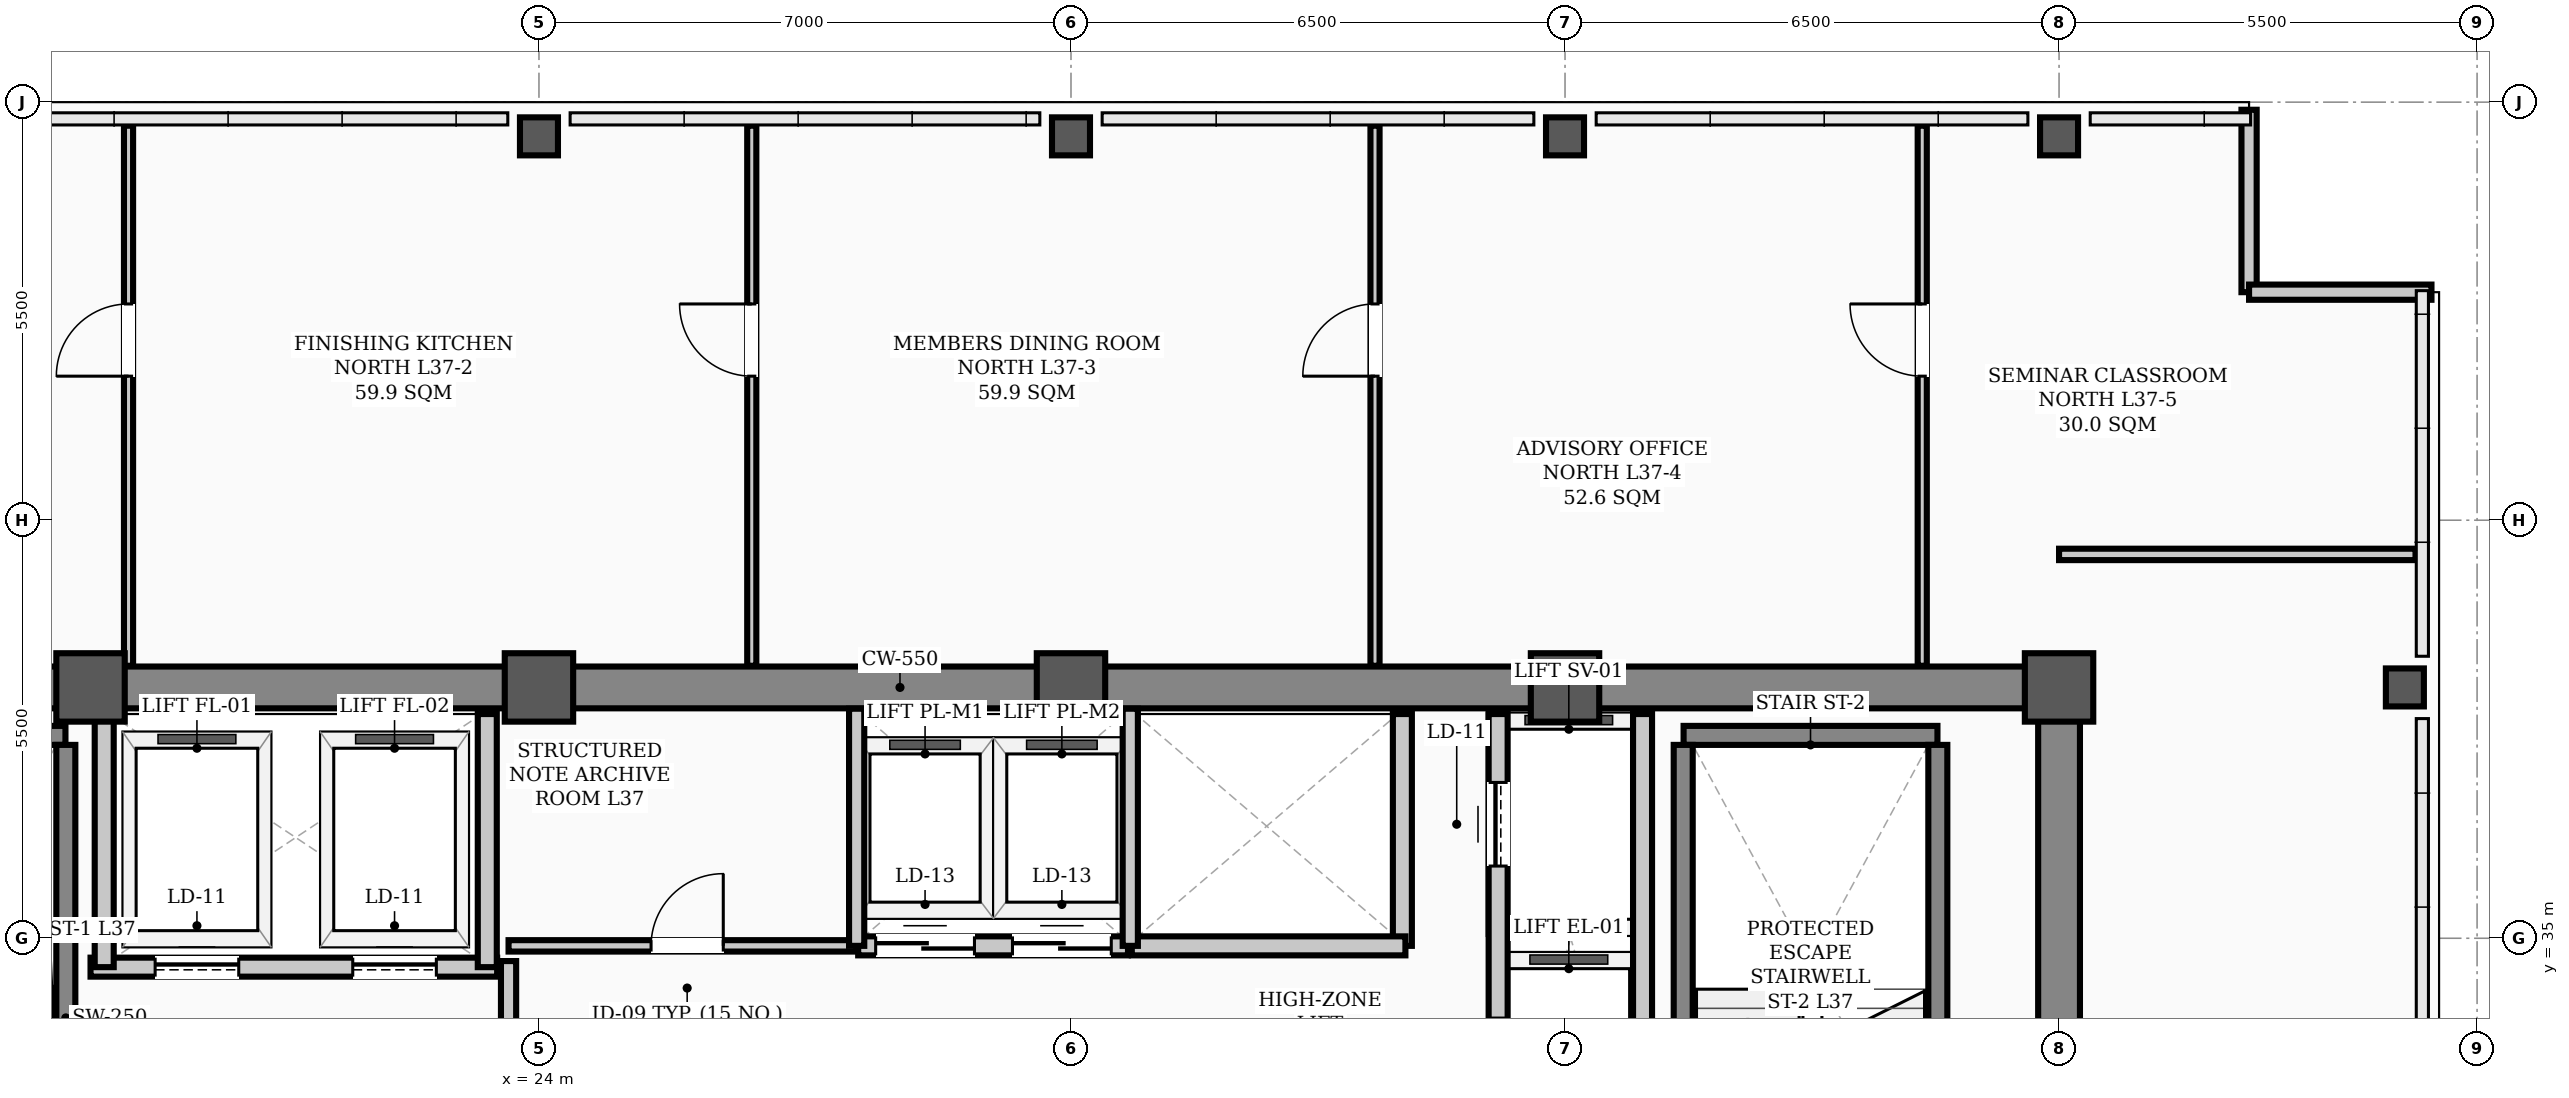
"""IFC4 building model, lengths in metres.
Left out: names, types, materials, properties, quantities, classifications, styles, units other than length and angle.
Written with IfcOpenShell. Run it as: python <this file> out.ifc"""

import sys

from ifc_helpers import new_model, si_unit, direction, frame, frame_2d, origin, origin_2d, place, context, subcontext, project, spatial, rectangle, hollow_rectangle, extrude, element, fill, save


model = new_model("IFC4")
c1 = context("Model", 3, precision=1e-05, world=origin(), true_north=direction((0.0, 1.0)))
c2 = subcontext(c1, "Body", "Model", "MODEL_VIEW")
j1 = project(units=[si_unit("LENGTHUNIT", "METRE"), si_unit("PLANEANGLEUNIT", "RADIAN")], contexts=[c1])
p1 = place(None, origin())
s1 = spatial("IfcSite", under=j1, at=p1, CompositionType="ELEMENT")
p2 = place(p1, origin())
s2 = spatial("IfcBuilding", under=s1, at=p2, CompositionType="ELEMENT")
p3 = place(p2, frame((0.0, 0.0, 150.0)))
s3 = spatial("IfcBuildingStorey", under=s2, at=p3, CompositionType="ELEMENT", Elevation=150.0)
for number, where, z_axis, x_axis in (
    (1, (18.1, 38.3, 0.0), (0.0, 0.0, 1.0), (1.0, 0.0, 0.0)),
    (2, (24.0, 38.3, 0.0), (0.0, 0.0, 1.0), (1.0, 0.0, 0.0)),
    (3, (31.0, 38.3, 0.0), (0.0, 0.0, 1.0), (1.0, 0.0, 0.0)),
    (4, (37.5, 38.3, 0.0), (0.0, 0.0, 1.0), (1.0, 0.0, 0.0)),
    (5, (44.0, 38.3, 0.0), (0.0, 0.0, 1.0), (1.0, 0.0, 0.0)),
):
    element("IfcColumn", number, at=place(p3, frame(where, z_axis=z_axis, x_axis=x_axis)), inside=s3, PredefinedType="COLUMN", context=c2, shape_type="SweptSolid", body=[
        extrude(hollow_rectangle(XDim=0.9, YDim=0.9, WallThickness=0.035, InnerFilletRadius=0.017, OuterFilletRadius=0.052, at=origin_2d()), origin(), (0.0, 0.0, 1.0), 3.9),
    ])
for number, where, z_axis, x_axis in (
    (6, (24.0, 45.55, 0.0), (0.0, 0.0, 1.0), (1.0, 0.0, 0.0)),
    (7, (31.0, 45.55, 0.0), (0.0, 0.0, 1.0), (1.0, 0.0, 0.0)),
    (8, (37.5, 45.55, 0.0), (0.0, 0.0, 1.0), (1.0, 0.0, 0.0)),
    (9, (44.0, 45.55, 0.0), (0.0, 0.0, 1.0), (1.0, 0.0, 0.0)),
    (10, (48.55, 38.3, 0.0), (0.0, 0.0, 1.0), (1.0, 0.0, 0.0)),
):
    element("IfcColumn", number, at=place(p3, frame(where, z_axis=z_axis, x_axis=x_axis)), inside=s3, PredefinedType="COLUMN", context=c2, shape_type="SweptSolid", body=[
        extrude(hollow_rectangle(XDim=0.5, YDim=0.5, WallThickness=0.024, InnerFilletRadius=0.012, OuterFilletRadius=0.036, at=origin_2d()), origin(), (0.0, 0.0, 1.0), 3.9),
    ])
for number, where, z_axis, x_axis in (
    (11, (46.5, 45.9, 0.0), (0.0, 0.0, 1.0), (0.0, -1.0, 0.0)),
    (12, (46.5, 43.5, 0.0), (0.0, 0.0, 1.0), (1.0, 0.0, 0.0)),
):
    element("IfcWall", number, at=place(p3, frame(where, z_axis=z_axis, x_axis=x_axis)), inside=s3, PredefinedType="PARAPET", context=c2, shape_type="SweptSolid", body=[
        extrude(rectangle(XDim=2.4, YDim=0.2, at=frame_2d((1.2, 0.0))), origin(), (0.0, 0.0, 1.0), 1.2),
    ])
p4 = place(p3, frame((13.5, 38.3, 0.0), z_axis=(0.0, 0.0, 1.0), x_axis=(1.0, 0.0, 0.0)))
e13 = element("IfcWall", 13, at=p4, inside=s3, PredefinedType="SHEAR", context=c2, shape_type="SweptSolid", body=[
    extrude(rectangle(XDim=30.5, YDim=0.55, at=frame_2d((15.25, 0.0))), origin(), (0.0, 0.0, 1.0), 3.72),
])
p5 = place(p3, frame((44.0, 29.35, 0.0), z_axis=(0.0, 0.0, 1.0), x_axis=(0.0, 1.0, 0.0)))
e14 = element("IfcWall", 14, at=p5, inside=s3, PredefinedType="SHEAR", context=c2, shape_type="SweptSolid", body=[
    extrude(rectangle(XDim=8.6, YDim=0.55, at=frame_2d((4.3, 0.0))), origin(), (0.0, 0.0, 1.0), 3.72),
])
p6 = place(p3, frame((14.43, 37.669, 0.0), z_axis=(0.0, 0.0, 1.0), x_axis=(1.0, 0.0, 0.0)))
e15 = element("IfcWall", 15, at=p6, inside=s3, PredefinedType="STANDARD", context=c2, shape_type="SweptSolid", body=[
    extrude(rectangle(XDim=3.34, YDim=0.25, at=frame_2d((1.67, 0.0))), origin(), (0.0, 0.0, 1.0), 3.72),
])
p7 = place(p3, frame((17.775, 30.36, 0.0), z_axis=(0.0, 0.0, 1.0), x_axis=(0.0, 1.0, 0.0)))
e16 = element("IfcWall", 16, at=p7, inside=s3, PredefinedType="STANDARD", context=c2, shape_type="SweptSolid", body=[
    extrude(rectangle(XDim=7.184, YDim=0.25, at=frame_2d((3.592, 0.0))), origin(), (0.0, 0.0, 1.0), 3.72),
])
p8 = place(p3, frame((39.06, 37.669, 0.0), z_axis=(0.0, 0.0, 1.0), x_axis=(1.0, 0.0, 0.0)))
e17 = element("IfcWall", 17, at=p8, inside=s3, PredefinedType="STANDARD", context=c2, shape_type="SweptSolid", body=[
    extrude(rectangle(XDim=3.34, YDim=0.25, at=frame_2d((1.67, 0.0))), origin(), (0.0, 0.0, 1.0), 3.72),
])
for number, where, z_axis, x_axis in (
    (18, (39.055, 30.36, 0.0), (0.0, 0.0, 1.0), (0.0, 1.0, 0.0)),
    (19, (42.405, 30.36, 0.0), (0.0, 0.0, 1.0), (0.0, 1.0, 0.0)),
):
    element("IfcWall", number, at=place(p3, frame(where, z_axis=z_axis, x_axis=x_axis)), inside=s3, PredefinedType="STANDARD", context=c2, shape_type="SweptSolid", body=[
        extrude(rectangle(XDim=7.184, YDim=0.25, at=frame_2d((3.592, 0.0))), origin(), (0.0, 0.0, 1.0), 3.72),
    ])
p9 = place(p3, frame((18.1, 34.62, 0.0), z_axis=(0.0, 0.0, 1.0), x_axis=(1.0, 0.0, 0.0)))
e20 = element("IfcWall", 20, at=p9, inside=s3, PredefinedType="STANDARD", context=c2, shape_type="SweptSolid", body=[
    extrude(rectangle(XDim=5.35, YDim=0.25, at=frame_2d((2.675, 0.0))), origin(), (0.0, 0.0, 1.0), 3.72),
])
p10 = place(p9, frame((0.85, 0.0, 0.0)))
e21 = element("IfcOpeningElement", 21, at=p10, cuts=e20, PredefinedType="OPENING", context=c2, shape_type="SweptSolid", body=[
    extrude(rectangle(XDim=1.1, YDim=2.08, at=frame_2d((0.55, 1.04))), frame((0.0, 0.135, 0.0), z_axis=(0.0, -1.0, 0.0), x_axis=(1.0, 0.0, 0.0)), (0.0, 0.0, 1.0), 0.27),
])
p11 = place(p9, frame((3.45, 0.0, 0.0)))
e22 = element("IfcOpeningElement", 22, at=p11, cuts=e20, PredefinedType="OPENING", context=c2, shape_type="SweptSolid", body=[
    extrude(rectangle(XDim=1.1, YDim=2.08, at=frame_2d((0.55, 1.04))), frame((0.0, 0.135, 0.0), z_axis=(0.0, -1.0, 0.0), x_axis=(1.0, 0.0, 0.0)), (0.0, 0.0, 1.0), 0.27),
])
p12 = place(p3, frame((36.62, 31.95, 0.0), z_axis=(0.0, 0.0, 1.0), x_axis=(0.0, 1.0, 0.0)))
e23 = element("IfcWall", 23, at=p12, inside=s3, PredefinedType="STANDARD", context=c2, shape_type="SweptSolid", body=[
    extrude(rectangle(XDim=6.0, YDim=0.25, at=frame_2d((3.0, 0.0))), origin(), (0.0, 0.0, 1.0), 3.35),
])
p13 = place(p12, frame((0.9, 0.0, 0.0)))
e24 = element("IfcOpeningElement", 24, at=p13, cuts=e23, PredefinedType="OPENING", context=c2, shape_type="SweptSolid", body=[
    extrude(rectangle(XDim=1.1, YDim=2.08, at=frame_2d((0.55, 1.04))), frame((0.0, 0.135, 0.0), z_axis=(0.0, -1.0, 0.0), x_axis=(1.0, 0.0, 0.0)), (0.0, 0.0, 1.0), 0.27),
])
p14 = place(p12, frame((4.0, 0.0, 0.0)))
e25 = element("IfcOpeningElement", 25, at=p14, cuts=e23, PredefinedType="OPENING", context=c2, shape_type="SweptSolid", body=[
    extrude(rectangle(XDim=1.1, YDim=2.08, at=frame_2d((0.55, 1.04))), frame((0.0, 0.135, 0.0), z_axis=(0.0, -1.0, 0.0), x_axis=(1.0, 0.0, 0.0)), (0.0, 0.0, 1.0), 0.27),
])
p15 = place(p3, frame((38.52, 31.95, 0.0), z_axis=(0.0, 0.0, 1.0), x_axis=(0.0, 1.0, 0.0)))
e26 = element("IfcWall", 26, at=p15, inside=s3, PredefinedType="STANDARD", context=c2, shape_type="SweptSolid", body=[
    extrude(rectangle(XDim=6.0, YDim=0.25, at=frame_2d((3.0, 0.0))), origin(), (0.0, 0.0, 1.0), 3.35),
])
for number, where, z_axis, x_axis in (
    (27, (18.28, 34.62, 0.0), (0.0, 0.0, 1.0), (0.0, 1.0, 0.0)),
    (28, (23.32, 34.62, 0.0), (0.0, 0.0, 1.0), (0.0, 1.0, 0.0)),
):
    element("IfcWall", number, at=place(p3, frame(where, z_axis=z_axis, x_axis=x_axis)), inside=s3, PredefinedType="STANDARD", context=c2, shape_type="SweptSolid", body=[
        extrude(rectangle(XDim=3.33, YDim=0.25, at=frame_2d((1.665, 0.0))), origin(), (0.0, 0.0, 1.0), 3.35),
    ])
p16 = place(p3, frame((35.36, 34.9, 0.0), z_axis=(0.0, 0.0, 1.0), x_axis=(0.0, 1.0, 0.0)))
e29 = element("IfcWall", 29, at=p16, inside=s3, PredefinedType="STANDARD", context=c2, shape_type="SweptSolid", body=[
    extrude(rectangle(XDim=3.05, YDim=0.25, at=frame_2d((1.525, 0.0))), origin(), (0.0, 0.0, 1.0), 3.35),
])
p17 = place(p3, frame((28.2, 34.9, 0.0), z_axis=(0.0, 0.0, 1.0), x_axis=(1.0, 0.0, 0.0)))
e30 = element("IfcWall", 30, at=p17, inside=s3, PredefinedType="STANDARD", context=c2, shape_type="SweptSolid", body=[
    extrude(rectangle(XDim=3.55, YDim=0.25, at=frame_2d((1.775, 0.0))), origin(), (0.0, 0.0, 1.0), 3.72),
])
p18 = place(p17, frame((0.23, 0.0, 0.0)))
e31 = element("IfcOpeningElement", 31, at=p18, cuts=e30, PredefinedType="OPENING", context=c2, shape_type="SweptSolid", body=[
    extrude(rectangle(XDim=1.3, YDim=2.08, at=frame_2d((0.65, 1.04))), frame((0.0, 0.135, 0.0), z_axis=(0.0, -1.0, 0.0), x_axis=(1.0, 0.0, 0.0)), (0.0, 0.0, 1.0), 0.27),
])
p19 = place(p17, frame((2.03, 0.0, 0.0)))
e32 = element("IfcOpeningElement", 32, at=p19, cuts=e30, PredefinedType="OPENING", context=c2, shape_type="SweptSolid", body=[
    extrude(rectangle(XDim=1.3, YDim=2.08, at=frame_2d((0.65, 1.04))), frame((0.0, 0.135, 0.0), z_axis=(0.0, -1.0, 0.0), x_axis=(1.0, 0.0, 0.0)), (0.0, 0.0, 1.0), 0.27),
])
p20 = place(p3, frame((31.8, 34.9, 0.0), z_axis=(0.0, 0.0, 1.0), x_axis=(1.0, 0.0, 0.0)))
e33 = element("IfcWall", 33, at=p20, inside=s3, PredefinedType="STANDARD", context=c2, shape_type="SweptSolid", body=[
    extrude(rectangle(XDim=3.6, YDim=0.25, at=frame_2d((1.8, 0.0))), origin(), (0.0, 0.0, 1.0), 3.72),
])
p21 = place(p3, frame((23.6, 34.9, 0.0), z_axis=(0.0, 0.0, 1.0), x_axis=(1.0, 0.0, 0.0)))
e34 = element("IfcWall", 34, at=p21, inside=s3, PredefinedType="PARTITIONING", context=c2, shape_type="SweptSolid", body=[
    extrude(rectangle(XDim=4.58, YDim=0.15, at=frame_2d((2.29, 0.0))), origin(), (0.0, 0.0, 1.0), 3.72),
])
p22 = place(p21, frame((1.875, 0.0, 0.0)))
e35 = element("IfcOpeningElement", 35, at=p22, cuts=e34, PredefinedType="OPENING", context=c2, shape_type="SweptSolid", body=[
    extrude(rectangle(XDim=0.95, YDim=2.08, at=frame_2d((0.475, 1.04))), frame((0.0, 0.085, 0.0), z_axis=(0.0, -1.0, 0.0), x_axis=(1.0, 0.0, 0.0)), (0.0, 0.0, 1.0), 0.17),
])
p23 = place(p3, frame((44.0, 40.05, 0.0), z_axis=(0.0, 0.0, 1.0), x_axis=(1.0, 0.0, 0.0)))
e36 = element("IfcWall", 36, at=p23, inside=s3, PredefinedType="PARTITIONING", context=c2, shape_type="SweptSolid", body=[
    extrude(rectangle(XDim=4.69, YDim=0.15, at=frame_2d((2.345, 0.0))), origin(), (0.0, 0.0, 1.0), 3.2),
])
p24 = place(p3, frame((23.6, 29.285, 0.0), z_axis=(0.0, 0.0, 1.0), x_axis=(0.0, 1.0, 0.0)))
e37 = element("IfcWall", 37, at=p24, inside=s3, PredefinedType="STANDARD", context=c2, shape_type="SweptSolid", body=[
    extrude(rectangle(XDim=5.415, YDim=0.2, at=frame_2d((2.708, 0.0))), origin(), (0.0, 0.0, 1.0), 3.2),
])
p25 = place(p3, frame((18.6, 38.585, 0.0), z_axis=(0.0, 0.0, 1.0), x_axis=(0.0, 1.0, 0.0)))
e38 = element("IfcWall", 38, at=p25, inside=s3, PredefinedType="PARTITIONING", context=c2, shape_type="SweptSolid", body=[
    extrude(rectangle(XDim=7.105, YDim=0.12, at=frame_2d((3.552, 0.0))), origin(), (0.0, 0.0, 1.0), 3.212),
])
p26 = place(p25, frame((3.81, 0.0, 0.0)))
e39 = element("IfcOpeningElement", 39, at=p26, cuts=e38, PredefinedType="OPENING", context=c2, shape_type="SweptSolid", body=[
    extrude(rectangle(XDim=0.95, YDim=2.08, at=frame_2d((0.475, 1.04))), frame((0.0, 0.07, 0.0), z_axis=(0.0, -1.0, 0.0), x_axis=(1.0, 0.0, 0.0)), (0.0, 0.0, 1.0), 0.14),
])
p27 = place(p3, frame((26.8, 38.585, 0.0), z_axis=(0.0, 0.0, 1.0), x_axis=(0.0, 1.0, 0.0)))
e40 = element("IfcWall", 40, at=p27, inside=s3, PredefinedType="PARTITIONING", context=c2, shape_type="SweptSolid", body=[
    extrude(rectangle(XDim=7.105, YDim=0.12, at=frame_2d((3.552, 0.0))), origin(), (0.0, 0.0, 1.0), 3.212),
])
p28 = place(p27, frame((3.81, 0.0, 0.0)))
e41 = element("IfcOpeningElement", 41, at=p28, cuts=e40, PredefinedType="OPENING", context=c2, shape_type="SweptSolid", body=[
    extrude(rectangle(XDim=0.95, YDim=2.08, at=frame_2d((0.475, 1.04))), frame((0.0, 0.07, 0.0), z_axis=(0.0, -1.0, 0.0), x_axis=(1.0, 0.0, 0.0)), (0.0, 0.0, 1.0), 0.14),
])
p29 = place(p3, frame((35.0, 38.585, 0.0), z_axis=(0.0, 0.0, 1.0), x_axis=(0.0, 1.0, 0.0)))
e42 = element("IfcWall", 42, at=p29, inside=s3, PredefinedType="PARTITIONING", context=c2, shape_type="SweptSolid", body=[
    extrude(rectangle(XDim=7.105, YDim=0.12, at=frame_2d((3.552, 0.0))), origin(), (0.0, 0.0, 1.0), 3.212),
])
p30 = place(p29, frame((3.81, 0.0, 0.0)))
e43 = element("IfcOpeningElement", 43, at=p30, cuts=e42, PredefinedType="OPENING", context=c2, shape_type="SweptSolid", body=[
    extrude(rectangle(XDim=0.95, YDim=2.08, at=frame_2d((0.475, 1.04))), frame((0.0, 0.07, 0.0), z_axis=(0.0, -1.0, 0.0), x_axis=(1.0, 0.0, 0.0)), (0.0, 0.0, 1.0), 0.14),
])
p31 = place(p3, frame((42.2, 38.585, 0.0), z_axis=(0.0, 0.0, 1.0), x_axis=(0.0, 1.0, 0.0)))
e44 = element("IfcWall", 44, at=p31, inside=s3, PredefinedType="PARTITIONING", context=c2, shape_type="SweptSolid", body=[
    extrude(rectangle(XDim=7.105, YDim=0.12, at=frame_2d((3.552, 0.0))), origin(), (0.0, 0.0, 1.0), 3.212),
])
p32 = place(p31, frame((3.81, 0.0, 0.0)))
e45 = element("IfcOpeningElement", 45, at=p32, cuts=e44, PredefinedType="OPENING", context=c2, shape_type="SweptSolid", body=[
    extrude(rectangle(XDim=0.95, YDim=2.08, at=frame_2d((0.475, 1.04))), frame((0.0, 0.07, 0.0), z_axis=(0.0, -1.0, 0.0), x_axis=(1.0, 0.0, 0.0)), (0.0, 0.0, 1.0), 0.14),
])
for number, where, z_axis, x_axis in (
    (46, (28.18, 34.9, 0.0), (0.0, 0.0, 1.0), (0.0, 1.0, 0.0)),
    (47, (31.78, 34.9, 0.0), (0.0, 0.0, 1.0), (0.0, 1.0, 0.0)),
):
    element("IfcWall", number, at=place(p3, frame(where, z_axis=z_axis, x_axis=x_axis)), inside=s3, PredefinedType="STANDARD", context=c2, shape_type="SweptSolid", body=[
        extrude(rectangle(XDim=3.12, YDim=0.2, at=frame_2d((1.56, 0.0))), origin(), (0.0, 0.0, 1.0), 3.35),
    ])
p33 = place(p22, origin())
e48 = element("IfcDoor", 48, at=p33, inside=s3, OperationType="SINGLE_SWING_RIGHT", PredefinedType="DOOR", context=c2, shape_type="SweptSolid", body=[
    extrude(rectangle(XDim=0.95, YDim=2.08, at=frame_2d((0.475, 1.04))), frame((0.0, 0.025, 0.0), z_axis=(0.0, -1.0, 0.0), x_axis=(1.0, 0.0, 0.0)), (0.0, 0.0, 1.0), 0.05),
])
fill(e35, e48)
p34 = place(p26, origin())
e49 = element("IfcDoor", 49, at=p34, inside=s3, OperationType="SINGLE_SWING_LEFT", PredefinedType="DOOR", context=c2, shape_type="SweptSolid", body=[
    extrude(rectangle(XDim=0.95, YDim=2.08, at=frame_2d((0.475, 1.04))), frame((0.0, 0.025, 0.0), z_axis=(0.0, -1.0, 0.0), x_axis=(1.0, 0.0, 0.0)), (0.0, 0.0, 1.0), 0.05),
])
fill(e39, e49)
p35 = place(p28, origin())
e50 = element("IfcDoor", 50, at=p35, inside=s3, OperationType="SINGLE_SWING_RIGHT", PredefinedType="DOOR", context=c2, shape_type="SweptSolid", body=[
    extrude(rectangle(XDim=0.95, YDim=2.08, at=frame_2d((0.475, 1.04))), frame((0.0, 0.025, 0.0), z_axis=(0.0, -1.0, 0.0), x_axis=(1.0, 0.0, 0.0)), (0.0, 0.0, 1.0), 0.05),
])
fill(e41, e50)
p36 = place(p30, origin())
e51 = element("IfcDoor", 51, at=p36, inside=s3, OperationType="SINGLE_SWING_LEFT", PredefinedType="DOOR", context=c2, shape_type="SweptSolid", body=[
    extrude(rectangle(XDim=0.95, YDim=2.08, at=frame_2d((0.475, 1.04))), frame((0.0, 0.025, 0.0), z_axis=(0.0, -1.0, 0.0), x_axis=(1.0, 0.0, 0.0)), (0.0, 0.0, 1.0), 0.05),
])
fill(e43, e51)
p37 = place(p32, origin())
e52 = element("IfcDoor", 52, at=p37, inside=s3, OperationType="SINGLE_SWING_RIGHT", PredefinedType="DOOR", context=c2, shape_type="SweptSolid", body=[
    extrude(rectangle(XDim=0.95, YDim=2.08, at=frame_2d((0.475, 1.04))), frame((0.0, 0.025, 0.0), z_axis=(0.0, -1.0, 0.0), x_axis=(1.0, 0.0, 0.0)), (0.0, 0.0, 1.0), 0.05),
])
fill(e45, e52)
p38 = place(p10, origin())
e53 = element("IfcDoor", 53, at=p38, inside=s3, OperationType="SLIDING_TO_LEFT", PredefinedType="DOOR", context=c2, shape_type="SweptSolid", body=[
    extrude(rectangle(XDim=1.1, YDim=2.08, at=frame_2d((0.55, 1.04))), frame((0.0, 0.025, 0.0), z_axis=(0.0, -1.0, 0.0), x_axis=(1.0, 0.0, 0.0)), (0.0, 0.0, 1.0), 0.05),
])
fill(e21, e53)
p39 = place(p11, origin())
e54 = element("IfcDoor", 54, at=p39, inside=s3, OperationType="SLIDING_TO_LEFT", PredefinedType="DOOR", context=c2, shape_type="SweptSolid", body=[
    extrude(rectangle(XDim=1.1, YDim=2.08, at=frame_2d((0.55, 1.04))), frame((0.0, 0.025, 0.0), z_axis=(0.0, -1.0, 0.0), x_axis=(1.0, 0.0, 0.0)), (0.0, 0.0, 1.0), 0.05),
])
fill(e22, e54)
p40 = place(p14, origin())
e55 = element("IfcDoor", 55, at=p40, inside=s3, OperationType="SLIDING_TO_LEFT", PredefinedType="DOOR", context=c2, shape_type="SweptSolid", body=[
    extrude(rectangle(XDim=1.1, YDim=2.08, at=frame_2d((0.55, 1.04))), frame((0.0, 0.025, 0.0), z_axis=(0.0, -1.0, 0.0), x_axis=(1.0, 0.0, 0.0)), (0.0, 0.0, 1.0), 0.05),
])
fill(e25, e55)
p41 = place(p18, origin())
e56 = element("IfcDoor", 56, at=p41, inside=s3, OperationType="DOUBLE_DOOR_SLIDING", PredefinedType="DOOR", context=c2, shape_type="SweptSolid", body=[
    extrude(rectangle(XDim=1.3, YDim=2.08, at=frame_2d((0.65, 1.04))), frame((0.0, 0.025, 0.0), z_axis=(0.0, -1.0, 0.0), x_axis=(1.0, 0.0, 0.0)), (0.0, 0.0, 1.0), 0.05),
])
fill(e31, e56)
p42 = place(p19, origin())
e57 = element("IfcDoor", 57, at=p42, inside=s3, OperationType="DOUBLE_DOOR_SLIDING", PredefinedType="DOOR", context=c2, shape_type="SweptSolid", body=[
    extrude(rectangle(XDim=1.3, YDim=2.08, at=frame_2d((0.65, 1.04))), frame((0.0, 0.025, 0.0), z_axis=(0.0, -1.0, 0.0), x_axis=(1.0, 0.0, 0.0)), (0.0, 0.0, 1.0), 0.05),
])
fill(e32, e57)
save(model, sys.argv[1])
